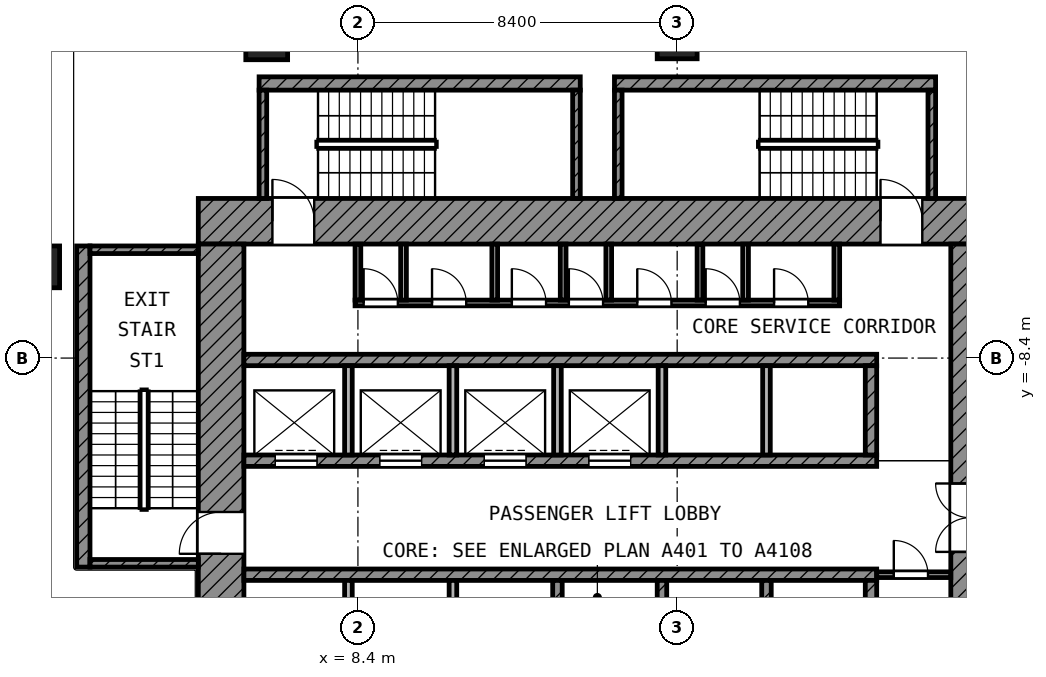
"""IFC4 building model, lengths in metres.
Left out: names, types, materials, properties, quantities, classifications, styles, units other than length and angle.
Written with IfcOpenShell. Run it as: python <this file> out.ifc"""

import sys

from ifc_helpers import new_model, si_unit, direction, frame, frame_2d, origin, origin_2d, place, context, subcontext, project, spatial, rectangle, extrude, element, fill, save


model = new_model("IFC4")
c1 = context("Model", 3, precision=1e-05, world=origin(), true_north=direction((0.0, 1.0)))
c2 = subcontext(c1, "Body", "Model", "MODEL_VIEW")
j1 = project(units=[si_unit("LENGTHUNIT", "METRE"), si_unit("PLANEANGLEUNIT", "RADIAN")], contexts=[c1])
p1 = place(None, origin())
s1 = spatial("IfcSite", under=j1, at=p1, CompositionType="ELEMENT")
p2 = place(p1, origin())
s2 = spatial("IfcBuilding", under=s1, at=p2, CompositionType="ELEMENT")
p3 = place(p2, frame((0.0, 0.0, 132.4)))
s3 = spatial("IfcBuildingStorey", under=s2, at=p3, CompositionType="ELEMENT", Elevation=132.4)
p4 = place(p3, frame((6.0, 0.0, 0.0), z_axis=(0.0, 0.0, 1.0), x_axis=(1.0, 0.0, 0.0)))
e1 = element("IfcColumn", 1, at=p4, inside=s3, PredefinedType="COLUMN", context=c2, shape_type="SweptSolid", body=[
    extrude(rectangle(XDim=1.1, YDim=1.1, at=origin_2d()), origin(), (0.0, 0.0, 1.0), 4.2),
])
p5 = place(p3, frame((16.8, 0.0, 0.0), z_axis=(0.0, 0.0, 1.0), x_axis=(1.0, 0.0, 0.0)))
e2 = element("IfcColumn", 2, at=p5, inside=s3, PredefinedType="COLUMN", context=c2, shape_type="SweptSolid", body=[
    extrude(rectangle(XDim=1.05, YDim=1.05, at=origin_2d()), origin(), (0.0, 0.0, 1.0), 4.2),
])
p6 = place(p3, frame((0.0, -6.0, 0.0), z_axis=(0.0, 0.0, 1.0), x_axis=(1.0, 0.0, 0.0)))
e3 = element("IfcColumn", 3, at=p6, inside=s3, PredefinedType="COLUMN", context=c2, shape_type="SweptSolid", body=[
    extrude(rectangle(XDim=1.1, YDim=1.1, at=origin_2d()), origin(), (0.0, 0.0, 1.0), 4.2),
])
p7 = place(p3, frame((4.2, -4.8, 0.0), z_axis=(0.0, 0.0, 1.0), x_axis=(1.0, 0.0, 0.0)))
e4 = element("IfcWall", 4, at=p7, inside=s3, PredefinedType="SHEAR", context=c2, shape_type="SweptSolid", body=[
    extrude(rectangle(XDim=20.8, YDim=1.2, at=frame_2d((10.4, 0.0))), origin(), (0.0, 0.0, 1.0), 3.6),
])
p8 = place(p7, frame((1.95, 0.0, 0.0)))
e5 = element("IfcOpeningElement", 5, at=p8, cuts=e4, PredefinedType="OPENING", context=c2, shape_type="SweptSolid", body=[
    extrude(rectangle(XDim=1.1, YDim=2.1, at=frame_2d((0.55, 1.05))), frame((0.0, 0.61, 0.0), z_axis=(0.0, -1.0, 0.0), x_axis=(1.0, 0.0, 0.0)), (0.0, 0.0, 1.0), 1.22),
])
p9 = place(p7, frame((17.95, 0.0, 0.0)))
e6 = element("IfcOpeningElement", 6, at=p9, cuts=e4, PredefinedType="OPENING", context=c2, shape_type="SweptSolid", body=[
    extrude(rectangle(XDim=1.1, YDim=2.1, at=frame_2d((0.55, 1.05))), frame((0.0, 0.61, 0.0), z_axis=(0.0, -1.0, 0.0), x_axis=(1.0, 0.0, 0.0)), (0.0, 0.0, 1.0), 1.22),
])
p10 = place(p3, frame((4.8, -25.0, 0.0), z_axis=(0.0, 0.0, 1.0), x_axis=(0.0, 1.0, 0.0)))
e7 = element("IfcWall", 7, at=p10, inside=s3, PredefinedType="SHEAR", context=c2, shape_type="SweptSolid", body=[
    extrude(rectangle(XDim=19.6, YDim=1.2, at=frame_2d((9.8, 0.0))), origin(), (0.0, 0.0, 1.0), 3.6),
])
p11 = place(p10, frame((11.45, 0.0, 0.0)))
e8 = element("IfcOpeningElement", 8, at=p11, cuts=e7, PredefinedType="OPENING", context=c2, shape_type="SweptSolid", body=[
    extrude(rectangle(XDim=1.1, YDim=2.1, at=frame_2d((0.55, 1.05))), frame((0.0, 0.61, 0.0), z_axis=(0.0, -1.0, 0.0), x_axis=(1.0, 0.0, 0.0)), (0.0, 0.0, 1.0), 1.22),
])
p12 = place(p10, frame((2.15, 0.0, 0.0)))
e9 = element("IfcOpeningElement", 9, at=p12, cuts=e7, PredefinedType="OPENING", context=c2, shape_type="SweptSolid", body=[
    extrude(rectangle(XDim=1.1, YDim=2.1, at=frame_2d((0.55, 1.05))), frame((0.0, 0.61, 0.0), z_axis=(0.0, -1.0, 0.0), x_axis=(1.0, 0.0, 0.0)), (0.0, 0.0, 1.0), 1.22),
])
p13 = place(p3, frame((24.5, -24.0, 0.0), z_axis=(0.0, 0.0, 1.0), x_axis=(0.0, 1.0, 0.0)))
e10 = element("IfcWall", 10, at=p13, inside=s3, PredefinedType="SHEAR", context=c2, shape_type="SweptSolid", body=[
    extrude(rectangle(XDim=18.6, YDim=1.0, at=frame_2d((9.3, 0.0))), origin(), (0.0, 0.0, 1.0), 3.6),
])
p14 = place(p13, frame((10.5, 0.0, 0.0)))
e11 = element("IfcOpeningElement", 11, at=p14, cuts=e10, PredefinedType="OPENING", context=c2, shape_type="SweptSolid", body=[
    extrude(rectangle(XDim=1.8, YDim=2.1, at=frame_2d((0.9, 1.05))), frame((0.0, 0.51, 0.0), z_axis=(0.0, -1.0, 0.0), x_axis=(1.0, 0.0, 0.0)), (0.0, 0.0, 1.0), 1.02),
])
p15 = place(p3, frame((5.4, -8.45, 0.0), z_axis=(0.0, 0.0, 1.0), x_axis=(1.0, 0.0, 0.0)))
e12 = element("IfcWall", 12, at=p15, inside=s3, PredefinedType="SHEAR", context=c2, shape_type="SweptSolid", body=[
    extrude(rectangle(XDim=16.65, YDim=0.3, at=frame_2d((8.325, 0.0))), origin(), (0.0, 0.0, 1.0), 3.6),
])
p16 = place(p3, frame((5.4, -11.1, 0.0), z_axis=(0.0, 0.0, 1.0), x_axis=(1.0, 0.0, 0.0)))
e13 = element("IfcWall", 13, at=p16, inside=s3, PredefinedType="SHEAR", context=c2, shape_type="SweptSolid", body=[
    extrude(rectangle(XDim=16.65, YDim=0.3, at=frame_2d((8.325, 0.0))), origin(), (0.0, 0.0, 1.0), 3.6),
])
p17 = place(p16, frame((0.825, 0.0, 0.0)))
e14 = element("IfcOpeningElement", 14, at=p17, cuts=e13, PredefinedType="OPENING", context=c2, shape_type="SweptSolid", body=[
    extrude(rectangle(XDim=1.1, YDim=2.1, at=frame_2d((0.55, 1.05))), frame((0.0, 0.16, 0.0), z_axis=(0.0, -1.0, 0.0), x_axis=(1.0, 0.0, 0.0)), (0.0, 0.0, 1.0), 0.32),
])
p18 = place(p16, frame((3.575, 0.0, 0.0)))
e15 = element("IfcOpeningElement", 15, at=p18, cuts=e13, PredefinedType="OPENING", context=c2, shape_type="SweptSolid", body=[
    extrude(rectangle(XDim=1.1, YDim=2.1, at=frame_2d((0.55, 1.05))), frame((0.0, 0.16, 0.0), z_axis=(0.0, -1.0, 0.0), x_axis=(1.0, 0.0, 0.0)), (0.0, 0.0, 1.0), 0.32),
])
p19 = place(p16, frame((6.325, 0.0, 0.0)))
e16 = element("IfcOpeningElement", 16, at=p19, cuts=e13, PredefinedType="OPENING", context=c2, shape_type="SweptSolid", body=[
    extrude(rectangle(XDim=1.1, YDim=2.1, at=frame_2d((0.55, 1.05))), frame((0.0, 0.16, 0.0), z_axis=(0.0, -1.0, 0.0), x_axis=(1.0, 0.0, 0.0)), (0.0, 0.0, 1.0), 0.32),
])
p20 = place(p16, frame((9.075, 0.0, 0.0)))
e17 = element("IfcOpeningElement", 17, at=p20, cuts=e13, PredefinedType="OPENING", context=c2, shape_type="SweptSolid", body=[
    extrude(rectangle(XDim=1.1, YDim=2.1, at=frame_2d((0.55, 1.05))), frame((0.0, 0.16, 0.0), z_axis=(0.0, -1.0, 0.0), x_axis=(1.0, 0.0, 0.0)), (0.0, 0.0, 1.0), 0.32),
])
p21 = place(p3, frame((5.4, -14.1, 0.0), z_axis=(0.0, 0.0, 1.0), x_axis=(1.0, 0.0, 0.0)))
e18 = element("IfcWall", 18, at=p21, inside=s3, PredefinedType="SHEAR", context=c2, shape_type="SweptSolid", body=[
    extrude(rectangle(XDim=16.65, YDim=0.3, at=frame_2d((8.325, 0.0))), origin(), (0.0, 0.0, 1.0), 3.6),
])
p22 = place(p3, frame((21.9, -10.95, 0.0), z_axis=(0.0, 0.0, 1.0), x_axis=(0.0, 1.0, 0.0)))
e19 = element("IfcWall", 19, at=p22, inside=s3, PredefinedType="SHEAR", context=c2, shape_type="SweptSolid", body=[
    extrude(rectangle(XDim=2.35, YDim=0.3, at=frame_2d((1.175, 0.0))), origin(), (0.0, 0.0, 1.0), 3.6),
])
p23 = place(p3, frame((21.9, -16.6, 0.0), z_axis=(0.0, 0.0, 1.0), x_axis=(0.0, 1.0, 0.0)))
e20 = element("IfcWall", 20, at=p23, inside=s3, PredefinedType="SHEAR", context=c2, shape_type="SweptSolid", body=[
    extrude(rectangle(XDim=2.35, YDim=0.3, at=frame_2d((1.175, 0.0))), origin(), (0.0, 0.0, 1.0), 3.6),
])
for number, where, z_axis, x_axis in (
    (21, (8.15, -10.95, 0.0), (0.0, 0.0, 1.0), (0.0, 1.0, 0.0)),
    (22, (10.9, -10.95, 0.0), (0.0, 0.0, 1.0), (0.0, 1.0, 0.0)),
    (23, (13.65, -10.95, 0.0), (0.0, 0.0, 1.0), (0.0, 1.0, 0.0)),
    (24, (16.4, -10.95, 0.0), (0.0, 0.0, 1.0), (0.0, 1.0, 0.0)),
    (25, (19.15, -10.95, 0.0), (0.0, 0.0, 1.0), (0.0, 1.0, 0.0)),
):
    element("IfcWall", number, at=place(p3, frame(where, z_axis=z_axis, x_axis=x_axis)), inside=s3, PredefinedType="PARTITIONING", context=c2, shape_type="SweptSolid", body=[
        extrude(rectangle(XDim=2.35, YDim=0.2, at=frame_2d((1.175, 0.0))), origin(), (0.0, 0.0, 1.0), 3.6),
    ])
for number, where, z_axis, x_axis in (
    (26, (8.15, -16.6, 0.0), (0.0, 0.0, 1.0), (0.0, 1.0, 0.0)),
    (27, (10.9, -16.6, 0.0), (0.0, 0.0, 1.0), (0.0, 1.0, 0.0)),
):
    element("IfcWall", number, at=place(p3, frame(where, z_axis=z_axis, x_axis=x_axis)), inside=s3, PredefinedType="PARTITIONING", context=c2, shape_type="SweptSolid", body=[
        extrude(rectangle(XDim=2.35, YDim=0.2, at=frame_2d((1.175, 0.0))), origin(), (0.0, 0.0, 1.0), 3.6),
    ])
for number, where, z_axis, x_axis in (
    (28, (13.65, -16.6, 0.0), (0.0, 0.0, 1.0), (0.0, 1.0, 0.0)),
    (29, (16.4, -16.6, 0.0), (0.0, 0.0, 1.0), (0.0, 1.0, 0.0)),
    (30, (19.15, -16.6, 0.0), (0.0, 0.0, 1.0), (0.0, 1.0, 0.0)),
):
    element("IfcWall", number, at=place(p3, frame(where, z_axis=z_axis, x_axis=x_axis)), inside=s3, PredefinedType="SHEAR", context=c2, shape_type="SweptSolid", body=[
        extrude(rectangle(XDim=2.35, YDim=0.25, at=frame_2d((1.175, 0.0))), origin(), (0.0, 0.0, 1.0), 3.6),
    ])
p24 = place(p3, frame((22.05, -14.1, 0.0), z_axis=(0.0, 0.0, 1.0), x_axis=(1.0, 0.0, 0.0)))
e31 = element("IfcWall", 31, at=p24, inside=s3, PredefinedType="PARTITIONING", context=c2, shape_type="SweptSolid", body=[
    extrude(rectangle(XDim=1.95, YDim=0.15, at=frame_2d((0.975, 0.0))), origin(), (0.0, 0.0, 1.0), 3.6),
])
p25 = place(p24, frame((0.45, 0.0, 0.0)))
e32 = element("IfcOpeningElement", 32, at=p25, cuts=e31, PredefinedType="OPENING", context=c2, shape_type="SweptSolid", body=[
    extrude(rectangle(XDim=0.9, YDim=2.1, at=frame_2d((0.45, 1.05))), frame((0.0, 0.085, 0.0), z_axis=(0.0, -1.0, 0.0), x_axis=(1.0, 0.0, 0.0)), (0.0, 0.0, 1.0), 0.17),
])
p26 = place(p3, frame((8.325, -6.95, 0.0), z_axis=(0.0, 0.0, 1.0), x_axis=(1.0, 0.0, 0.0)))
e33 = element("IfcWall", 33, at=p26, inside=s3, PredefinedType="PARTITIONING", context=c2, shape_type="SweptSolid", body=[
    extrude(rectangle(XDim=12.75, YDim=0.15, at=frame_2d((6.375, 0.0))), origin(), (0.0, 0.0, 1.0), 3.6),
])
p27 = place(p26, frame((0.225, 0.0, 0.0)))
e34 = element("IfcOpeningElement", 34, at=p27, cuts=e33, PredefinedType="OPENING", context=c2, shape_type="SweptSolid", body=[
    extrude(rectangle(XDim=0.9, YDim=2.1, at=frame_2d((0.45, 1.05))), frame((0.0, 0.085, 0.0), z_axis=(0.0, -1.0, 0.0), x_axis=(1.0, 0.0, 0.0)), (0.0, 0.0, 1.0), 0.17),
])
p28 = place(p26, frame((2.025, 0.0, 0.0)))
e35 = element("IfcOpeningElement", 35, at=p28, cuts=e33, PredefinedType="OPENING", context=c2, shape_type="SweptSolid", body=[
    extrude(rectangle(XDim=0.9, YDim=2.1, at=frame_2d((0.45, 1.05))), frame((0.0, 0.085, 0.0), z_axis=(0.0, -1.0, 0.0), x_axis=(1.0, 0.0, 0.0)), (0.0, 0.0, 1.0), 0.17),
])
p29 = place(p26, frame((4.125, 0.0, 0.0)))
e36 = element("IfcOpeningElement", 36, at=p29, cuts=e33, PredefinedType="OPENING", context=c2, shape_type="SweptSolid", body=[
    extrude(rectangle(XDim=0.9, YDim=2.1, at=frame_2d((0.45, 1.05))), frame((0.0, 0.085, 0.0), z_axis=(0.0, -1.0, 0.0), x_axis=(1.0, 0.0, 0.0)), (0.0, 0.0, 1.0), 0.17),
])
p30 = place(p26, frame((5.625, 0.0, 0.0)))
e37 = element("IfcOpeningElement", 37, at=p30, cuts=e33, PredefinedType="OPENING", context=c2, shape_type="SweptSolid", body=[
    extrude(rectangle(XDim=0.9, YDim=2.1, at=frame_2d((0.45, 1.05))), frame((0.0, 0.085, 0.0), z_axis=(0.0, -1.0, 0.0), x_axis=(1.0, 0.0, 0.0)), (0.0, 0.0, 1.0), 0.17),
])
p31 = place(p26, frame((7.425, 0.0, 0.0)))
e38 = element("IfcOpeningElement", 38, at=p31, cuts=e33, PredefinedType="OPENING", context=c2, shape_type="SweptSolid", body=[
    extrude(rectangle(XDim=0.9, YDim=2.1, at=frame_2d((0.45, 1.05))), frame((0.0, 0.085, 0.0), z_axis=(0.0, -1.0, 0.0), x_axis=(1.0, 0.0, 0.0)), (0.0, 0.0, 1.0), 0.17),
])
p32 = place(p26, frame((9.225, 0.0, 0.0)))
e39 = element("IfcOpeningElement", 39, at=p32, cuts=e33, PredefinedType="OPENING", context=c2, shape_type="SweptSolid", body=[
    extrude(rectangle(XDim=0.9, YDim=2.1, at=frame_2d((0.45, 1.05))), frame((0.0, 0.085, 0.0), z_axis=(0.0, -1.0, 0.0), x_axis=(1.0, 0.0, 0.0)), (0.0, 0.0, 1.0), 0.17),
])
p33 = place(p26, frame((11.025, 0.0, 0.0)))
e40 = element("IfcOpeningElement", 40, at=p33, cuts=e33, PredefinedType="OPENING", context=c2, shape_type="SweptSolid", body=[
    extrude(rectangle(XDim=0.9, YDim=2.1, at=frame_2d((0.45, 1.05))), frame((0.0, 0.085, 0.0), z_axis=(0.0, -1.0, 0.0), x_axis=(1.0, 0.0, 0.0)), (0.0, 0.0, 1.0), 0.17),
])
for number, where, z_axis, x_axis in (
    (41, (8.4, -6.875, 0.0), (0.0, 0.0, 1.0), (0.0, 1.0, 0.0)),
    (42, (9.6, -6.875, 0.0), (0.0, 0.0, 1.0), (0.0, 1.0, 0.0)),
    (43, (12.0, -6.875, 0.0), (0.0, 0.0, 1.0), (0.0, 1.0, 0.0)),
    (44, (13.8, -6.875, 0.0), (0.0, 0.0, 1.0), (0.0, 1.0, 0.0)),
    (45, (15.0, -6.875, 0.0), (0.0, 0.0, 1.0), (0.0, 1.0, 0.0)),
    (46, (17.4, -6.875, 0.0), (0.0, 0.0, 1.0), (0.0, 1.0, 0.0)),
    (47, (18.6, -6.875, 0.0), (0.0, 0.0, 1.0), (0.0, 1.0, 0.0)),
    (48, (21.0, -6.875, 0.0), (0.0, 0.0, 1.0), (0.0, 1.0, 0.0)),
):
    element("IfcWall", number, at=place(p3, frame(where, z_axis=z_axis, x_axis=x_axis)), inside=s3, PredefinedType="PARTITIONING", context=c2, shape_type="SweptSolid", body=[
        extrude(rectangle(XDim=1.475, YDim=0.15, at=frame_2d((0.738, 0.0))), origin(), (0.0, 0.0, 1.0), 3.6),
    ])
p34 = place(p3, frame((1.175, -13.9, 0.0), z_axis=(0.0, 0.0, 1.0), x_axis=(0.0, 1.0, 0.0)))
e49 = element("IfcWall", 49, at=p34, inside=s3, PredefinedType="SHEAR", context=c2, shape_type="SweptSolid", body=[
    extrude(rectangle(XDim=8.45, YDim=0.35, at=frame_2d((4.225, 0.0))), origin(), (0.0, 0.0, 1.0), 3.6),
])
for number, where, z_axis, x_axis in (
    (50, (1.35, -5.55, 0.0), (0.0, 0.0, 1.0), (1.0, 0.0, 0.0)),
    (51, (1.35, -13.8, 0.0), (0.0, 0.0, 1.0), (1.0, 0.0, 0.0)),
):
    element("IfcWall", number, at=place(p3, frame(where, z_axis=z_axis, x_axis=x_axis)), inside=s3, PredefinedType="SHEAR", context=c2, shape_type="SweptSolid", body=[
        extrude(rectangle(XDim=2.85, YDim=0.2, at=frame_2d((1.425, 0.0))), origin(), (0.0, 0.0, 1.0), 3.6),
    ])
p35 = place(p3, frame((5.8, -1.175, 0.0), z_axis=(0.0, 0.0, 1.0), x_axis=(1.0, 0.0, 0.0)))
e52 = element("IfcWall", 52, at=p35, inside=s3, PredefinedType="SHEAR", context=c2, shape_type="SweptSolid", body=[
    extrude(rectangle(XDim=8.45, YDim=0.35, at=frame_2d((4.225, 0.0))), origin(), (0.0, 0.0, 1.0), 3.6),
])
for number, where, z_axis, x_axis in (
    (53, (5.9, -4.2, 0.0), (0.0, 0.0, 1.0), (0.0, 1.0, 0.0)),
    (54, (14.15, -4.2, 0.0), (0.0, 0.0, 1.0), (0.0, 1.0, 0.0)),
):
    element("IfcWall", number, at=place(p3, frame(where, z_axis=z_axis, x_axis=x_axis)), inside=s3, PredefinedType="SHEAR", context=c2, shape_type="SweptSolid", body=[
        extrude(rectangle(XDim=2.85, YDim=0.2, at=frame_2d((1.425, 0.0))), origin(), (0.0, 0.0, 1.0), 3.6),
    ])
p36 = place(p3, frame((15.15, -1.175, 0.0), z_axis=(0.0, 0.0, 1.0), x_axis=(1.0, 0.0, 0.0)))
e55 = element("IfcWall", 55, at=p36, inside=s3, PredefinedType="SHEAR", context=c2, shape_type="SweptSolid", body=[
    extrude(rectangle(XDim=8.45, YDim=0.35, at=frame_2d((4.225, 0.0))), origin(), (0.0, 0.0, 1.0), 3.6),
])
for number, where, z_axis, x_axis in (
    (56, (15.25, -4.2, 0.0), (0.0, 0.0, 1.0), (0.0, 1.0, 0.0)),
    (57, (23.5, -4.2, 0.0), (0.0, 0.0, 1.0), (0.0, 1.0, 0.0)),
):
    element("IfcWall", number, at=place(p3, frame(where, z_axis=z_axis, x_axis=x_axis)), inside=s3, PredefinedType="SHEAR", context=c2, shape_type="SweptSolid", body=[
        extrude(rectangle(XDim=2.85, YDim=0.2, at=frame_2d((1.425, 0.0))), origin(), (0.0, 0.0, 1.0), 3.6),
    ])
p37 = place(p17, origin())
e58 = element("IfcDoor", 58, at=p37, inside=s3, OperationType="DOUBLE_DOOR_SLIDING", PredefinedType="DOOR", context=c2, shape_type="SweptSolid", body=[
    extrude(rectangle(XDim=1.1, YDim=2.1, at=frame_2d((0.55, 1.05))), frame((0.0, 0.025, 0.0), z_axis=(0.0, -1.0, 0.0), x_axis=(1.0, 0.0, 0.0)), (0.0, 0.0, 1.0), 0.05),
])
fill(e14, e58)
p38 = place(p18, origin())
e59 = element("IfcDoor", 59, at=p38, inside=s3, OperationType="DOUBLE_DOOR_SLIDING", PredefinedType="DOOR", context=c2, shape_type="SweptSolid", body=[
    extrude(rectangle(XDim=1.1, YDim=2.1, at=frame_2d((0.55, 1.05))), frame((0.0, 0.025, 0.0), z_axis=(0.0, -1.0, 0.0), x_axis=(1.0, 0.0, 0.0)), (0.0, 0.0, 1.0), 0.05),
])
fill(e15, e59)
p39 = place(p19, origin())
e60 = element("IfcDoor", 60, at=p39, inside=s3, OperationType="DOUBLE_DOOR_SLIDING", PredefinedType="DOOR", context=c2, shape_type="SweptSolid", body=[
    extrude(rectangle(XDim=1.1, YDim=2.1, at=frame_2d((0.55, 1.05))), frame((0.0, 0.025, 0.0), z_axis=(0.0, -1.0, 0.0), x_axis=(1.0, 0.0, 0.0)), (0.0, 0.0, 1.0), 0.05),
])
fill(e16, e60)
p40 = place(p20, origin())
e61 = element("IfcDoor", 61, at=p40, inside=s3, OperationType="DOUBLE_DOOR_SLIDING", PredefinedType="DOOR", context=c2, shape_type="SweptSolid", body=[
    extrude(rectangle(XDim=1.1, YDim=2.1, at=frame_2d((0.55, 1.05))), frame((0.0, 0.025, 0.0), z_axis=(0.0, -1.0, 0.0), x_axis=(1.0, 0.0, 0.0)), (0.0, 0.0, 1.0), 0.05),
])
fill(e17, e61)
p41 = place(p11, origin())
e62 = element("IfcDoor", 62, at=p41, inside=s3, OperationType="SINGLE_SWING_LEFT", PredefinedType="DOOR", context=c2, shape_type="SweptSolid", body=[
    extrude(rectangle(XDim=1.1, YDim=2.1, at=frame_2d((0.55, 1.05))), frame((0.0, 0.025, 0.0), z_axis=(0.0, -1.0, 0.0), x_axis=(1.0, 0.0, 0.0)), (0.0, 0.0, 1.0), 0.05),
])
fill(e8, e62)
p42 = place(p8, origin())
e63 = element("IfcDoor", 63, at=p42, inside=s3, OperationType="SINGLE_SWING_LEFT", PredefinedType="DOOR", context=c2, shape_type="SweptSolid", body=[
    extrude(rectangle(XDim=1.1, YDim=2.1, at=frame_2d((0.55, 1.05))), frame((0.0, 0.025, 0.0), z_axis=(0.0, -1.0, 0.0), x_axis=(1.0, 0.0, 0.0)), (0.0, 0.0, 1.0), 0.05),
])
fill(e5, e63)
p43 = place(p9, origin())
e64 = element("IfcDoor", 64, at=p43, inside=s3, OperationType="SINGLE_SWING_LEFT", PredefinedType="DOOR", context=c2, shape_type="SweptSolid", body=[
    extrude(rectangle(XDim=1.1, YDim=2.1, at=frame_2d((0.55, 1.05))), frame((0.0, 0.025, 0.0), z_axis=(0.0, -1.0, 0.0), x_axis=(1.0, 0.0, 0.0)), (0.0, 0.0, 1.0), 0.05),
])
fill(e6, e64)
p44 = place(p27, origin())
e65 = element("IfcDoor", 65, at=p44, inside=s3, OperationType="SINGLE_SWING_LEFT", PredefinedType="DOOR", context=c2, shape_type="SweptSolid", body=[
    extrude(rectangle(XDim=0.9, YDim=2.1, at=frame_2d((0.45, 1.05))), frame((0.0, 0.025, 0.0), z_axis=(0.0, -1.0, 0.0), x_axis=(1.0, 0.0, 0.0)), (0.0, 0.0, 1.0), 0.05),
])
fill(e34, e65)
p45 = place(p28, origin())
e66 = element("IfcDoor", 66, at=p45, inside=s3, OperationType="SINGLE_SWING_LEFT", PredefinedType="DOOR", context=c2, shape_type="SweptSolid", body=[
    extrude(rectangle(XDim=0.9, YDim=2.1, at=frame_2d((0.45, 1.05))), frame((0.0, 0.025, 0.0), z_axis=(0.0, -1.0, 0.0), x_axis=(1.0, 0.0, 0.0)), (0.0, 0.0, 1.0), 0.05),
])
fill(e35, e66)
p46 = place(p29, origin())
e67 = element("IfcDoor", 67, at=p46, inside=s3, OperationType="SINGLE_SWING_LEFT", PredefinedType="DOOR", context=c2, shape_type="SweptSolid", body=[
    extrude(rectangle(XDim=0.9, YDim=2.1, at=frame_2d((0.45, 1.05))), frame((0.0, 0.025, 0.0), z_axis=(0.0, -1.0, 0.0), x_axis=(1.0, 0.0, 0.0)), (0.0, 0.0, 1.0), 0.05),
])
fill(e36, e67)
p47 = place(p30, origin())
e68 = element("IfcDoor", 68, at=p47, inside=s3, OperationType="SINGLE_SWING_LEFT", PredefinedType="DOOR", context=c2, shape_type="SweptSolid", body=[
    extrude(rectangle(XDim=0.9, YDim=2.1, at=frame_2d((0.45, 1.05))), frame((0.0, 0.025, 0.0), z_axis=(0.0, -1.0, 0.0), x_axis=(1.0, 0.0, 0.0)), (0.0, 0.0, 1.0), 0.05),
])
fill(e37, e68)
p48 = place(p31, origin())
e69 = element("IfcDoor", 69, at=p48, inside=s3, OperationType="SINGLE_SWING_LEFT", PredefinedType="DOOR", context=c2, shape_type="SweptSolid", body=[
    extrude(rectangle(XDim=0.9, YDim=2.1, at=frame_2d((0.45, 1.05))), frame((0.0, 0.025, 0.0), z_axis=(0.0, -1.0, 0.0), x_axis=(1.0, 0.0, 0.0)), (0.0, 0.0, 1.0), 0.05),
])
fill(e38, e69)
p49 = place(p32, origin())
e70 = element("IfcDoor", 70, at=p49, inside=s3, OperationType="SINGLE_SWING_LEFT", PredefinedType="DOOR", context=c2, shape_type="SweptSolid", body=[
    extrude(rectangle(XDim=0.9, YDim=2.1, at=frame_2d((0.45, 1.05))), frame((0.0, 0.025, 0.0), z_axis=(0.0, -1.0, 0.0), x_axis=(1.0, 0.0, 0.0)), (0.0, 0.0, 1.0), 0.05),
])
fill(e39, e70)
p50 = place(p33, origin())
e71 = element("IfcDoor", 71, at=p50, inside=s3, OperationType="SINGLE_SWING_LEFT", PredefinedType="DOOR", context=c2, shape_type="SweptSolid", body=[
    extrude(rectangle(XDim=0.9, YDim=2.1, at=frame_2d((0.45, 1.05))), frame((0.0, 0.025, 0.0), z_axis=(0.0, -1.0, 0.0), x_axis=(1.0, 0.0, 0.0)), (0.0, 0.0, 1.0), 0.05),
])
fill(e40, e71)
p51 = place(p25, origin())
e72 = element("IfcDoor", 72, at=p51, inside=s3, OperationType="SINGLE_SWING_LEFT", PredefinedType="DOOR", context=c2, shape_type="SweptSolid", body=[
    extrude(rectangle(XDim=0.9, YDim=2.1, at=frame_2d((0.45, 1.05))), frame((0.0, 0.025, 0.0), z_axis=(0.0, -1.0, 0.0), x_axis=(1.0, 0.0, 0.0)), (0.0, 0.0, 1.0), 0.05),
])
fill(e32, e72)
save(model, sys.argv[1])
